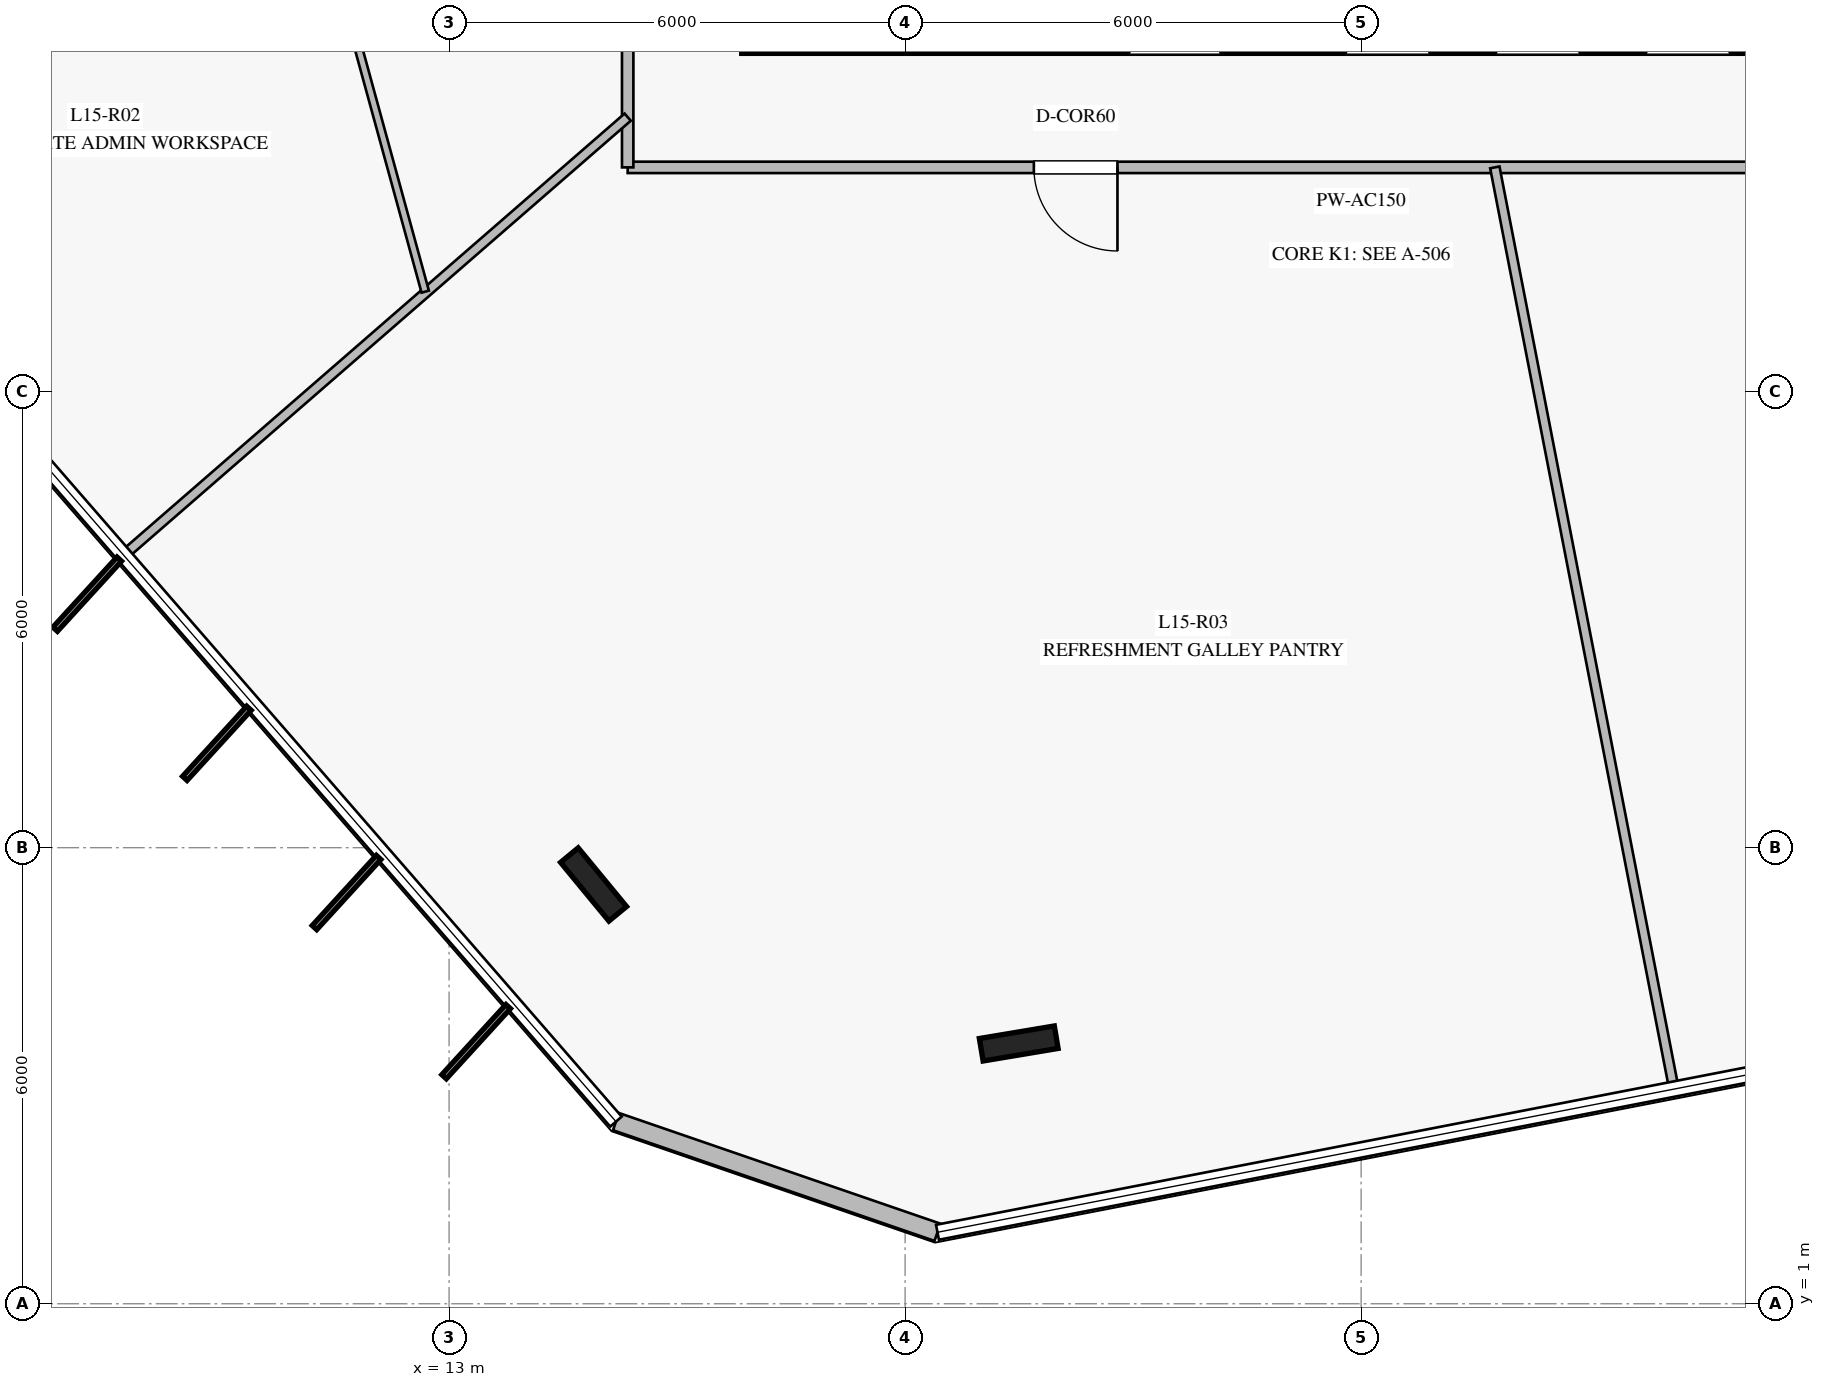
"""IFC4 building model, lengths in metres.
Left out: names, types, materials, properties, quantities, classifications, styles, units other than length and angle.
Written with IfcOpenShell. Run it as: python <this file> out.ifc"""

import sys

from ifc_helpers import new_model, si_unit, direction, frame, frame_2d, origin, origin_2d, place, context, subcontext, project, spatial, rectangle, i_section, extrude, element, fill, save


model = new_model("IFC4")
c1 = context("Model", 3, precision=1e-05, world=origin(), true_north=direction((0.0, 1.0)))
c2 = subcontext(c1, "Body", "Model", "MODEL_VIEW")
j1 = project(units=[si_unit("LENGTHUNIT", "METRE"), si_unit("PLANEANGLEUNIT", "RADIAN")], contexts=[c1])
p1 = place(None, origin())
s1 = spatial("IfcSite", under=j1, at=p1, CompositionType="ELEMENT")
p2 = place(p1, origin())
s2 = spatial("IfcBuilding", under=s1, at=p2, CompositionType="ELEMENT")
p3 = place(p2, frame((0.0, 0.0, 64.0)))
s3 = spatial("IfcBuildingStorey", under=s2, at=p3, CompositionType="ELEMENT", Elevation=64.0)
p4 = place(p3, frame((16.85, 17.8, 0.0), z_axis=(0.0, 0.0, 1.0), x_axis=(1.0, 0.0, 0.0)))
e1 = element("IfcWall", 1, at=p4, inside=s3, PredefinedType="SHEAR", context=c2, shape_type="SweptSolid", body=[
    extrude(rectangle(XDim=16.3, YDim=0.7, at=frame_2d((8.15, 0.0))), origin(), (0.0, 0.0, 1.0), 3.76),
])
p5 = place(p4, frame((5.1, 0.0, 0.0)))
e2 = element("IfcOpeningElement", 2, at=p5, cuts=e1, PredefinedType="OPENING", context=c2, shape_type="SweptSolid", body=[
    extrude(rectangle(XDim=1.2, YDim=2.25, at=frame_2d((0.6, 1.125))), frame((0.0, 0.36, 0.0), z_axis=(0.0, -1.0, 0.0), x_axis=(1.0, 0.0, 0.0)), (0.0, 0.0, 1.0), 0.72),
])
p6 = place(p4, frame((14.05, 0.0, 0.0)))
e3 = element("IfcOpeningElement", 3, at=p6, cuts=e1, PredefinedType="OPENING", context=c2, shape_type="SweptSolid", body=[
    extrude(rectangle(XDim=0.9, YDim=2.1, at=frame_2d((0.45, 1.05))), frame((0.0, 0.36, 0.0), z_axis=(0.0, -1.0, 0.0), x_axis=(1.0, 0.0, 0.0)), (0.0, 0.0, 1.0), 0.72),
])
p7 = place(p4, frame((7.95, 0.0, 0.0)))
e4 = element("IfcOpeningElement", 4, at=p7, cuts=e1, PredefinedType="OPENING", context=c2, shape_type="SweptSolid", body=[
    extrude(rectangle(XDim=1.1, YDim=2.2, at=frame_2d((0.55, 1.1))), frame((0.0, 0.36, 0.0), z_axis=(0.0, -1.0, 0.0), x_axis=(1.0, 0.0, 0.0)), (0.0, 0.0, 1.0), 0.72),
])
p8 = place(p4, frame((9.925, 0.0, 0.0)))
e5 = element("IfcOpeningElement", 5, at=p8, cuts=e1, PredefinedType="OPENING", context=c2, shape_type="SweptSolid", body=[
    extrude(rectangle(XDim=1.1, YDim=2.2, at=frame_2d((0.55, 1.1))), frame((0.0, 0.36, 0.0), z_axis=(0.0, -1.0, 0.0), x_axis=(1.0, 0.0, 0.0)), (0.0, 0.0, 1.0), 0.72),
])
p9 = place(p4, frame((11.9, 0.0, 0.0)))
e6 = element("IfcOpeningElement", 6, at=p9, cuts=e1, PredefinedType="OPENING", context=c2, shape_type="SweptSolid", body=[
    extrude(rectangle(XDim=1.1, YDim=2.2, at=frame_2d((0.55, 1.1))), frame((0.0, 0.36, 0.0), z_axis=(0.0, -1.0, 0.0), x_axis=(1.0, 0.0, 0.0)), (0.0, 0.0, 1.0), 0.72),
])
p10 = place(p3, frame((17.2, 17.8, 0.0), z_axis=(0.0, 0.0, 1.0), x_axis=(1.0, 0.0, 0.0)))
e7 = element("IfcColumn", 7, at=p10, inside=s3, PredefinedType="COLUMN", context=c2, shape_type="SweptSolid", body=[
    extrude(i_section(OverallWidth=0.302, OverallDepth=0.91, WebThickness=0.021, FlangeThickness=0.04, at=origin_2d()), origin(), (0.0, 0.0, 1.0), 4.0),
])
for number, where, z_axis, x_axis in (
    (8, (14.901, 6.516, 0.0), (0.0, 0.0, 1.0), (-0.636, 0.772, 0.0)),
    (9, (20.495, 4.424, 0.0), (0.0, 0.0, 1.0), (0.986, 0.165, 0.0)),
):
    element("IfcColumn", number, at=place(p3, frame(where, z_axis=z_axis, x_axis=x_axis)), inside=s3, PredefinedType="COLUMN", context=c2, shape_type="SweptSolid", body=[
        extrude(i_section(OverallWidth=0.3, OverallDepth=1.0, WebThickness=0.019, FlangeThickness=0.036, at=origin_2d()), origin(), (0.0, 0.0, 1.0), 4.0),
    ])
p11 = place(p3, frame((15.196, 3.396, 0.0), z_axis=(0.0, 0.0, 1.0), x_axis=(0.945549150447, -0.325479345104, 0.0)))
e10 = element("IfcWall", 10, at=p11, inside=s3, PredefinedType="STANDARD", context=c2, shape_type="SweptSolid", body=[
    extrude(rectangle(XDim=4.474, YDim=0.24, at=frame_2d((2.237, 0.0))), origin(), (0.0, 0.0, 1.0), 3.76),
])
p12 = place(p3, frame((34.65, 15.95, 0.0), z_axis=(0.0, 0.0, 1.0), x_axis=(-1.0, 0.0, 0.0)))
e11 = element("IfcWall", 11, at=p12, inside=s3, PredefinedType="PARTITIONING", context=c2, shape_type="SweptSolid", body=[
    extrude(rectangle(XDim=19.3, YDim=0.15, at=frame_2d((9.65, 0.0))), origin(), (0.0, 0.0, 1.0), 3.21),
])
p13 = place(p12, frame((12.856, 0.0, 0.0)))
e12 = element("IfcOpeningElement", 12, at=p13, cuts=e11, PredefinedType="OPENING", context=c2, shape_type="SweptSolid", body=[
    extrude(rectangle(XDim=1.1, YDim=2.2, at=frame_2d((0.55, 1.1))), frame((0.0, 0.085, 0.0), z_axis=(0.0, -1.0, 0.0), x_axis=(1.0, 0.0, 0.0)), (0.0, 0.0, 1.0), 0.17),
])
p14 = place(p3, frame((15.35, 15.95, 0.0), z_axis=(0.0, 0.0, 1.0), x_axis=(0.0, 1.0, 0.0)))
e13 = element("IfcWall", 13, at=p14, inside=s3, PredefinedType="PARTITIONING", context=c2, shape_type="SweptSolid", body=[
    extrude(rectangle(XDim=18.1, YDim=0.15, at=frame_2d((9.05, 0.0))), origin(), (0.0, 0.0, 1.0), 3.21),
])
p15 = place(p14, frame((5.15, 0.0, 0.0)))
e14 = element("IfcOpeningElement", 14, at=p15, cuts=e13, PredefinedType="OPENING", context=c2, shape_type="SweptSolid", body=[
    extrude(rectangle(XDim=1.1, YDim=2.2, at=frame_2d((0.55, 1.1))), frame((0.0, 0.085, 0.0), z_axis=(0.0, -1.0, 0.0), x_axis=(1.0, 0.0, 0.0)), (0.0, 0.0, 1.0), 0.17),
])
p16 = place(p3, frame((15.35, 16.611, 0.0), z_axis=(0.0, 0.0, 1.0), x_axis=(-0.754759550248, -0.65600154063, 0.0)))
e15 = element("IfcWall", 15, at=p16, inside=s3, PredefinedType="PARTITIONING", context=c2, shape_type="SweptSolid", body=[
    extrude(rectangle(XDim=8.769, YDim=0.125, at=frame_2d((4.384, 0.0))), origin(), (0.0, 0.0, 1.0), 3.06),
])
p17 = place(p3, frame((26.759, 15.95, 0.0), z_axis=(0.0, 0.0, 1.0), x_axis=(0.190830458369, -0.981623011221, 0.0)))
e16 = element("IfcWall", 16, at=p17, inside=s3, PredefinedType="PARTITIONING", context=c2, shape_type="SweptSolid", body=[
    extrude(rectangle(XDim=12.336, YDim=0.125, at=frame_2d((6.168, 0.0))), origin(), (0.0, 0.0, 1.0), 3.02),
])
p18 = place(p3, frame((8.963, 27.902, 0.0), z_axis=(0.0, 0.0, 1.0), x_axis=(0.264277102177, -0.964446791308, 0.0)))
e17 = element("IfcWall", 17, at=p18, inside=s3, PredefinedType="MOVABLE", context=c2, shape_type="SweptSolid", body=[
    extrude(rectangle(XDim=14.088, YDim=0.1, at=frame_2d((7.044, 0.0))), origin(), (0.0, 0.0, 1.0), 3.05),
])
p19 = place(p18, frame((6.454, 0.0, 0.0)))
e18 = element("IfcOpeningElement", 18, at=p19, cuts=e17, PredefinedType="OPENING", context=c2, shape_type="SweptSolid", body=[
    extrude(rectangle(XDim=1.0, YDim=2.15, at=frame_2d((0.5, 1.075))), frame((0.0, 0.06, 0.0), z_axis=(0.0, -1.0, 0.0), x_axis=(1.0, 0.0, 0.0)), (0.0, 0.0, 1.0), 0.12),
])
p20 = place(p13, origin())
e19 = element("IfcDoor", 19, at=p20, inside=s3, OperationType="SINGLE_SWING_LEFT", PredefinedType="DOOR", context=c2, shape_type="SweptSolid", body=[
    extrude(rectangle(XDim=1.1, YDim=2.2, at=frame_2d((0.55, 1.1))), frame((0.0, 0.025, 0.0), z_axis=(0.0, -1.0, 0.0), x_axis=(1.0, 0.0, 0.0)), (0.0, 0.0, 1.0), 0.05),
])
fill(e12, e19)
save(model, sys.argv[1])
